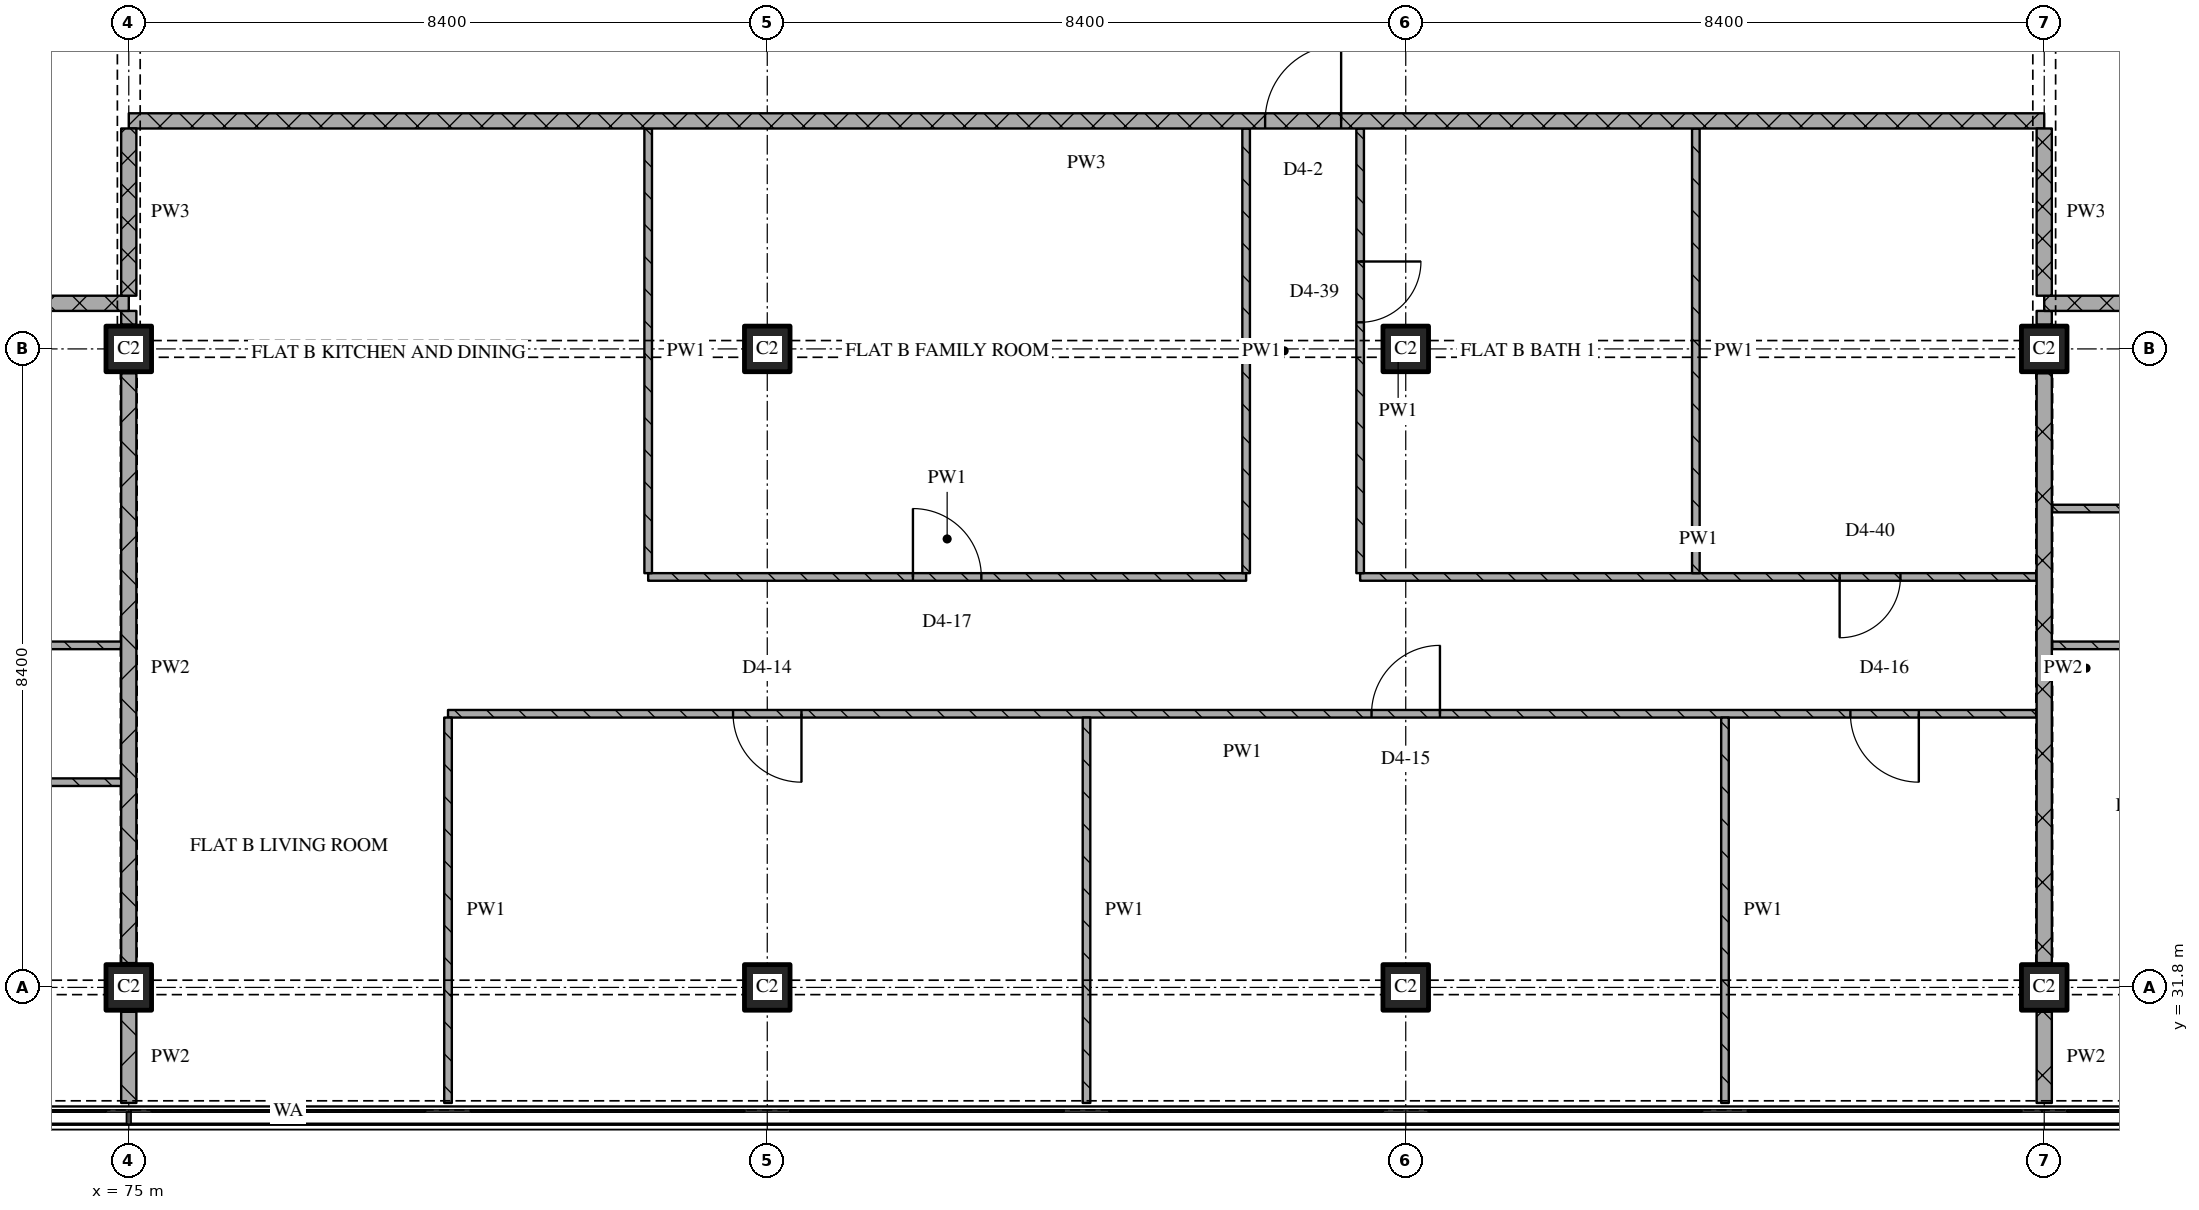
"""IFC4 building model, lengths in metres.
Left out: names, types, materials, properties, quantities, classifications, styles, units other than length and angle.
Written with IfcOpenShell. Run it as: python <this file> out.ifc"""

import sys

from ifc_helpers import new_model, si_unit, direction, frame, frame_2d, origin, origin_2d, place, context, subcontext, project, spatial, rectangle, extrude, element, fill, save


model = new_model("IFC4")
c1 = context("Model", 3, precision=1e-05, world=origin(), true_north=direction((0.0, 1.0)))
c2 = subcontext(c1, "Body", "Model", "MODEL_VIEW")
j1 = project(units=[si_unit("LENGTHUNIT", "METRE"), si_unit("PLANEANGLEUNIT", "RADIAN")], contexts=[c1])
p1 = place(None, origin())
s1 = spatial("IfcSite", under=j1, at=p1, CompositionType="ELEMENT")
p2 = place(p1, origin())
s2 = spatial("IfcBuilding", under=s1, at=p2, CompositionType="ELEMENT")
p3 = place(p2, frame((0.0, 0.0, 241.5)))
s3 = spatial("IfcBuildingStorey", under=s2, at=p3, CompositionType="ELEMENT", Elevation=241.5)
for number, where, z_axis, x_axis in (
    (1, (75.0, 31.8, 0.0), (0.0, 0.0, 1.0), (1.0, 0.0, 0.0)),
    (2, (75.0, 40.2, 0.0), (0.0, 0.0, 1.0), (1.0, 0.0, 0.0)),
    (3, (83.4, 31.8, 0.0), (0.0, 0.0, 1.0), (1.0, 0.0, 0.0)),
    (4, (83.4, 40.2, 0.0), (0.0, 0.0, 1.0), (1.0, 0.0, 0.0)),
    (5, (91.8, 31.8, 0.0), (0.0, 0.0, 1.0), (1.0, 0.0, 0.0)),
    (6, (91.8, 40.2, 0.0), (0.0, 0.0, 1.0), (1.0, 0.0, 0.0)),
    (7, (100.2, 31.8, 0.0), (0.0, 0.0, 1.0), (1.0, 0.0, 0.0)),
    (8, (100.2, 40.2, 0.0), (0.0, 0.0, 1.0), (1.0, 0.0, 0.0)),
):
    element("IfcColumn", number, at=place(p3, frame(where, z_axis=z_axis, x_axis=x_axis)), inside=s3, PredefinedType="COLUMN", context=c2, shape_type="SweptSolid", body=[
        extrude(rectangle(XDim=0.6, YDim=0.6, at=origin_2d()), origin(), (0.0, 0.0, 1.0), 3.6),
    ])
p4 = place(p3, frame((74.9, 34.5, 0.0), z_axis=(0.0, 0.0, 1.0), x_axis=(-1.0, 0.0, 0.0)))
e9 = element("IfcWall", 9, at=p4, inside=s3, PredefinedType="PARTITIONING", context=c2, shape_type="SweptSolid", body=[
    extrude(rectangle(XDim=16.7, YDim=0.1, at=frame_2d((8.35, 0.0))), origin(), (0.0, 0.0, 1.0), 3.32),
])
p5 = place(p4, frame((3.65, 0.0, 0.0)))
e10 = element("IfcOpeningElement", 10, at=p5, cuts=e9, PredefinedType="OPENING", context=c2, shape_type="SweptSolid", body=[
    extrude(rectangle(XDim=0.9, YDim=2.1, at=frame_2d((0.45, 1.05))), frame((0.0, 0.06, 0.0), z_axis=(0.0, -1.0, 0.0), x_axis=(1.0, 0.0, 0.0)), (0.0, 0.0, 1.0), 0.12),
])
p6 = place(p4, frame((12.05, 0.0, 0.0)))
e11 = element("IfcOpeningElement", 11, at=p6, cuts=e9, PredefinedType="OPENING", context=c2, shape_type="SweptSolid", body=[
    extrude(rectangle(XDim=0.9, YDim=2.1, at=frame_2d((0.45, 1.05))), frame((0.0, 0.06, 0.0), z_axis=(0.0, -1.0, 0.0), x_axis=(1.0, 0.0, 0.0)), (0.0, 0.0, 1.0), 0.12),
])
p7 = place(p3, frame((100.1, 35.4, 0.0), z_axis=(0.0, 0.0, 1.0), x_axis=(-1.0, 0.0, 0.0)))
e12 = element("IfcWall", 12, at=p7, inside=s3, PredefinedType="PARTITIONING", context=c2, shape_type="SweptSolid", body=[
    extrude(rectangle(XDim=20.9, YDim=0.1, at=frame_2d((10.45, 0.0))), origin(), (0.0, 0.0, 1.0), 3.32),
])
p8 = place(p7, frame((1.55, 0.0, 0.0)))
e13 = element("IfcOpeningElement", 13, at=p8, cuts=e12, PredefinedType="OPENING", context=c2, shape_type="SweptSolid", body=[
    extrude(rectangle(XDim=0.9, YDim=2.1, at=frame_2d((0.45, 1.05))), frame((0.0, 0.06, 0.0), z_axis=(0.0, -1.0, 0.0), x_axis=(1.0, 0.0, 0.0)), (0.0, 0.0, 1.0), 0.12),
])
p9 = place(p7, frame((7.85, 0.0, 0.0)))
e14 = element("IfcOpeningElement", 14, at=p9, cuts=e12, PredefinedType="OPENING", context=c2, shape_type="SweptSolid", body=[
    extrude(rectangle(XDim=0.9, YDim=2.1, at=frame_2d((0.45, 1.05))), frame((0.0, 0.06, 0.0), z_axis=(0.0, -1.0, 0.0), x_axis=(1.0, 0.0, 0.0)), (0.0, 0.0, 1.0), 0.12),
])
p10 = place(p7, frame((16.25, 0.0, 0.0)))
e15 = element("IfcOpeningElement", 15, at=p10, cuts=e12, PredefinedType="OPENING", context=c2, shape_type="SweptSolid", body=[
    extrude(rectangle(XDim=0.9, YDim=2.1, at=frame_2d((0.45, 1.05))), frame((0.0, 0.06, 0.0), z_axis=(0.0, -1.0, 0.0), x_axis=(1.0, 0.0, 0.0)), (0.0, 0.0, 1.0), 0.12),
])
p11 = place(p3, frame((65.1, 36.3, 0.0), z_axis=(0.0, 0.0, 1.0), x_axis=(1.0, 0.0, 0.0)))
e16 = element("IfcWall", 16, at=p11, inside=s3, PredefinedType="PARTITIONING", context=c2, shape_type="SweptSolid", body=[
    extrude(rectangle(XDim=9.8, YDim=0.1, at=frame_2d((4.9, 0.0))), origin(), (0.0, 0.0, 1.0), 3.32),
])
p12 = place(p11, frame((6.8, 0.0, 0.0)))
e17 = element("IfcOpeningElement", 17, at=p12, cuts=e16, PredefinedType="OPENING", context=c2, shape_type="SweptSolid", body=[
    extrude(rectangle(XDim=0.8, YDim=2.1, at=frame_2d((0.4, 1.05))), frame((0.0, 0.06, 0.0), z_axis=(0.0, -1.0, 0.0), x_axis=(1.0, 0.0, 0.0)), (0.0, 0.0, 1.0), 0.12),
])
p13 = place(p3, frame((112.8, 36.3, 0.0), z_axis=(0.0, 0.0, 1.0), x_axis=(-1.0, 0.0, 0.0)))
e18 = element("IfcWall", 18, at=p13, inside=s3, PredefinedType="PARTITIONING", context=c2, shape_type="SweptSolid", body=[
    extrude(rectangle(XDim=12.5, YDim=0.1, at=frame_2d((6.25, 0.0))), origin(), (0.0, 0.0, 1.0), 3.32),
])
p14 = place(p13, frame((10.05, 0.0, 0.0)))
e19 = element("IfcOpeningElement", 19, at=p14, cuts=e18, PredefinedType="OPENING", context=c2, shape_type="SweptSolid", body=[
    extrude(rectangle(XDim=0.9, YDim=2.1, at=frame_2d((0.45, 1.05))), frame((0.0, 0.06, 0.0), z_axis=(0.0, -1.0, 0.0), x_axis=(1.0, 0.0, 0.0)), (0.0, 0.0, 1.0), 0.12),
])
p15 = place(p3, frame((81.833, 37.2, 0.0), z_axis=(0.0, 0.0, 1.0), x_axis=(1.0, 0.0, 0.0)))
e20 = element("IfcWall", 20, at=p15, inside=s3, PredefinedType="PARTITIONING", context=c2, shape_type="SweptSolid", body=[
    extrude(rectangle(XDim=7.867, YDim=0.1, at=frame_2d((3.933, 0.0))), origin(), (0.0, 0.0, 1.0), 3.32),
])
p16 = place(p15, frame((3.483, 0.0, 0.0)))
e21 = element("IfcOpeningElement", 21, at=p16, cuts=e20, PredefinedType="OPENING", context=c2, shape_type="SweptSolid", body=[
    extrude(rectangle(XDim=0.9, YDim=2.1, at=frame_2d((0.45, 1.05))), frame((0.0, 0.06, 0.0), z_axis=(0.0, -1.0, 0.0), x_axis=(1.0, 0.0, 0.0)), (0.0, 0.0, 1.0), 0.12),
])
p17 = place(p3, frame((91.2, 37.2, 0.0), z_axis=(0.0, 0.0, 1.0), x_axis=(1.0, 0.0, 0.0)))
e22 = element("IfcWall", 22, at=p17, inside=s3, PredefinedType="PARTITIONING", context=c2, shape_type="SweptSolid", body=[
    extrude(rectangle(XDim=8.9, YDim=0.1, at=frame_2d((4.45, 0.0))), origin(), (0.0, 0.0, 1.0), 3.32),
])
p18 = place(p17, frame((6.308, 0.0, 0.0)))
e23 = element("IfcOpeningElement", 23, at=p18, cuts=e22, PredefinedType="OPENING", context=c2, shape_type="SweptSolid", body=[
    extrude(rectangle(XDim=0.8, YDim=2.1, at=frame_2d((0.4, 1.05))), frame((0.0, 0.06, 0.0), z_axis=(0.0, -1.0, 0.0), x_axis=(1.0, 0.0, 0.0)), (0.0, 0.0, 1.0), 0.12),
])
p19 = place(p3, frame((100.3, 38.1, 0.0), z_axis=(0.0, 0.0, 1.0), x_axis=(1.0, 0.0, 0.0)))
e24 = element("IfcWall", 24, at=p19, inside=s3, PredefinedType="PARTITIONING", context=c2, shape_type="SweptSolid", body=[
    extrude(rectangle(XDim=8.6, YDim=0.1, at=frame_2d((4.3, 0.0))), origin(), (0.0, 0.0, 1.0), 3.32),
])
p20 = place(p19, frame((1.75, 0.0, 0.0)))
e25 = element("IfcOpeningElement", 25, at=p20, cuts=e24, PredefinedType="OPENING", context=c2, shape_type="SweptSolid", body=[
    extrude(rectangle(XDim=0.8, YDim=2.1, at=frame_2d((0.4, 1.05))), frame((0.0, 0.06, 0.0), z_axis=(0.0, -1.0, 0.0), x_axis=(1.0, 0.0, 0.0)), (0.0, 0.0, 1.0), 0.12),
])
p21 = place(p3, frame((75.0, 40.8, 0.0), z_axis=(0.0, 0.0, 1.0), x_axis=(-1.0, 0.0, 0.0)))
e26 = element("IfcWall", 26, at=p21, inside=s3, PredefinedType="PARTITIONING", context=c2, shape_type="SweptSolid", body=[
    extrude(rectangle(XDim=24.38, YDim=0.2, at=frame_2d((12.19, 0.0))), origin(), (0.0, 0.0, 1.0), 3.32),
])
p22 = place(p21, frame((10.15, 0.0, 0.0)))
e27 = element("IfcOpeningElement", 27, at=p22, cuts=e26, PredefinedType="OPENING", context=c2, shape_type="SweptSolid", body=[
    extrude(rectangle(XDim=1.0, YDim=2.1, at=frame_2d((0.5, 1.05))), frame((0.0, 0.11, 0.0), z_axis=(0.0, -1.0, 0.0), x_axis=(1.0, 0.0, 0.0)), (0.0, 0.0, 1.0), 0.22),
])
p23 = place(p3, frame((124.58, 40.8, 0.0), z_axis=(0.0, 0.0, 1.0), x_axis=(-1.0, 0.0, 0.0)))
e28 = element("IfcWall", 28, at=p23, inside=s3, PredefinedType="PARTITIONING", context=c2, shape_type="SweptSolid", body=[
    extrude(rectangle(XDim=24.38, YDim=0.2, at=frame_2d((12.19, 0.0))), origin(), (0.0, 0.0, 1.0), 3.32),
])
p24 = place(p23, frame((14.43, 0.0, 0.0)))
e29 = element("IfcOpeningElement", 29, at=p24, cuts=e28, PredefinedType="OPENING", context=c2, shape_type="SweptSolid", body=[
    extrude(rectangle(XDim=1.0, YDim=2.1, at=frame_2d((0.5, 1.05))), frame((0.0, 0.11, 0.0), z_axis=(0.0, -1.0, 0.0), x_axis=(1.0, 0.0, 0.0)), (0.0, 0.0, 1.0), 0.22),
])
p25 = place(p3, frame((100.2, 43.2, 0.0), z_axis=(0.0, 0.0, 1.0), x_axis=(-1.0, 0.0, 0.0)))
e30 = element("IfcWall", 30, at=p25, inside=s3, PredefinedType="PARTITIONING", context=c2, shape_type="SweptSolid", body=[
    extrude(rectangle(XDim=25.2, YDim=0.2, at=frame_2d((12.6, 0.0))), origin(), (0.0, 0.0, 1.0), 3.32),
])
p26 = place(p25, frame((9.25, 0.0, 0.0)))
e31 = element("IfcOpeningElement", 31, at=p26, cuts=e30, PredefinedType="OPENING", context=c2, shape_type="SweptSolid", body=[
    extrude(rectangle(XDim=1.0, YDim=2.1, at=frame_2d((0.5, 1.05))), frame((0.0, 0.11, 0.0), z_axis=(0.0, -1.0, 0.0), x_axis=(1.0, 0.0, 0.0)), (0.0, 0.0, 1.0), 0.22),
])
p27 = place(p3, frame((75.0, 43.1, 0.0), z_axis=(0.0, 0.0, 1.0), x_axis=(0.0, -1.0, 0.0)))
e32 = element("IfcWall", 32, at=p27, inside=s3, PredefinedType="PARTITIONING", context=c2, shape_type="SweptSolid", body=[
    extrude(rectangle(XDim=2.2, YDim=0.2, at=frame_2d((1.1, 0.0))), origin(), (0.0, 0.0, 1.0), 2.53),
])
p28 = place(p3, frame((75.0, 31.48, 0.0), z_axis=(0.0, 0.0, 1.0), x_axis=(0.0, -1.0, 0.0)))
e33 = element("IfcWall", 33, at=p28, inside=s3, PredefinedType="PARTITIONING", context=c2, shape_type="SweptSolid", body=[
    extrude(rectangle(XDim=1.2, YDim=0.2, at=frame_2d((0.6, 0.0))), origin(), (0.0, 0.0, 1.0), 3.32),
])
p29 = place(p3, frame((75.0, 39.88, 0.0), z_axis=(0.0, 0.0, 1.0), x_axis=(0.0, -1.0, 0.0)))
e34 = element("IfcWall", 34, at=p29, inside=s3, PredefinedType="PARTITIONING", context=c2, shape_type="SweptSolid", body=[
    extrude(rectangle(XDim=7.76, YDim=0.2, at=frame_2d((3.88, 0.0))), origin(), (0.0, 0.0, 1.0), 2.72),
])
p30 = place(p3, frame((75.0, 40.7, 0.0), z_axis=(0.0, 0.0, 1.0), x_axis=(0.0, -1.0, 0.0)))
e35 = element("IfcWall", 35, at=p30, inside=s3, PredefinedType="PARTITIONING", context=c2, shape_type="SweptSolid", body=[
    extrude(rectangle(XDim=0.18, YDim=0.2, at=frame_2d((0.09, 0.0))), origin(), (0.0, 0.0, 1.0), 3.32),
])
p31 = place(p3, frame((79.2, 35.35, 0.0), z_axis=(0.0, 0.0, 1.0), x_axis=(0.0, -1.0, 0.0)))
e36 = element("IfcWall", 36, at=p31, inside=s3, PredefinedType="PARTITIONING", context=c2, shape_type="SweptSolid", body=[
    extrude(rectangle(XDim=5.07, YDim=0.1, at=frame_2d((2.535, 0.0))), origin(), (0.0, 0.0, 1.0), 3.32),
])
p32 = place(p3, frame((81.833, 43.1, 0.0), z_axis=(0.0, 0.0, 1.0), x_axis=(0.0, -1.0, 0.0)))
e37 = element("IfcWall", 37, at=p32, inside=s3, PredefinedType="PARTITIONING", context=c2, shape_type="SweptSolid", body=[
    extrude(rectangle(XDim=5.85, YDim=0.1, at=frame_2d((2.925, 0.0))), origin(), (0.0, 0.0, 1.0), 3.32),
])
p33 = place(p3, frame((87.6, 35.35, 0.0), z_axis=(0.0, 0.0, 1.0), x_axis=(0.0, -1.0, 0.0)))
e38 = element("IfcWall", 38, at=p33, inside=s3, PredefinedType="PARTITIONING", context=c2, shape_type="SweptSolid", body=[
    extrude(rectangle(XDim=5.07, YDim=0.1, at=frame_2d((2.535, 0.0))), origin(), (0.0, 0.0, 1.0), 3.32),
])
p34 = place(p3, frame((89.7, 43.1, 0.0), z_axis=(0.0, 0.0, 1.0), x_axis=(0.0, -1.0, 0.0)))
e39 = element("IfcWall", 39, at=p34, inside=s3, PredefinedType="PARTITIONING", context=c2, shape_type="SweptSolid", body=[
    extrude(rectangle(XDim=5.85, YDim=0.1, at=frame_2d((2.925, 0.0))), origin(), (0.0, 0.0, 1.0), 3.32),
])
p35 = place(p3, frame((91.2, 43.1, 0.0), z_axis=(0.0, 0.0, 1.0), x_axis=(0.0, -1.0, 0.0)))
e40 = element("IfcWall", 40, at=p35, inside=s3, PredefinedType="PARTITIONING", context=c2, shape_type="SweptSolid", body=[
    extrude(rectangle(XDim=5.85, YDim=0.1, at=frame_2d((2.925, 0.0))), origin(), (0.0, 0.0, 1.0), 3.32),
])
p36 = place(p35, frame((1.75, 0.0, 0.0)))
e41 = element("IfcOpeningElement", 41, at=p36, cuts=e40, PredefinedType="OPENING", context=c2, shape_type="SweptSolid", body=[
    extrude(rectangle(XDim=0.8, YDim=2.1, at=frame_2d((0.4, 1.05))), frame((0.0, 0.06, 0.0), z_axis=(0.0, -1.0, 0.0), x_axis=(1.0, 0.0, 0.0)), (0.0, 0.0, 1.0), 0.12),
])
p37 = place(p3, frame((95.617, 43.1, 0.0), z_axis=(0.0, 0.0, 1.0), x_axis=(0.0, -1.0, 0.0)))
e42 = element("IfcWall", 42, at=p37, inside=s3, PredefinedType="PARTITIONING", context=c2, shape_type="SweptSolid", body=[
    extrude(rectangle(XDim=5.85, YDim=0.1, at=frame_2d((2.925, 0.0))), origin(), (0.0, 0.0, 1.0), 3.32),
])
p38 = place(p3, frame((96.0, 35.35, 0.0), z_axis=(0.0, 0.0, 1.0), x_axis=(0.0, -1.0, 0.0)))
e43 = element("IfcWall", 43, at=p38, inside=s3, PredefinedType="PARTITIONING", context=c2, shape_type="SweptSolid", body=[
    extrude(rectangle(XDim=5.07, YDim=0.1, at=frame_2d((2.535, 0.0))), origin(), (0.0, 0.0, 1.0), 3.32),
])
p39 = place(p3, frame((100.2, 43.1, 0.0), z_axis=(0.0, 0.0, 1.0), x_axis=(0.0, -1.0, 0.0)))
e44 = element("IfcWall", 44, at=p39, inside=s3, PredefinedType="PARTITIONING", context=c2, shape_type="SweptSolid", body=[
    extrude(rectangle(XDim=2.2, YDim=0.2, at=frame_2d((1.1, 0.0))), origin(), (0.0, 0.0, 1.0), 2.53),
])
p40 = place(p3, frame((100.2, 31.48, 0.0), z_axis=(0.0, 0.0, 1.0), x_axis=(0.0, -1.0, 0.0)))
e45 = element("IfcWall", 45, at=p40, inside=s3, PredefinedType="PARTITIONING", context=c2, shape_type="SweptSolid", body=[
    extrude(rectangle(XDim=1.2, YDim=0.2, at=frame_2d((0.6, 0.0))), origin(), (0.0, 0.0, 1.0), 3.32),
])
p41 = place(p3, frame((100.2, 39.88, 0.0), z_axis=(0.0, 0.0, 1.0), x_axis=(0.0, -1.0, 0.0)))
e46 = element("IfcWall", 46, at=p41, inside=s3, PredefinedType="PARTITIONING", context=c2, shape_type="SweptSolid", body=[
    extrude(rectangle(XDim=7.76, YDim=0.2, at=frame_2d((3.88, 0.0))), origin(), (0.0, 0.0, 1.0), 2.72),
])
p42 = place(p3, frame((100.2, 40.7, 0.0), z_axis=(0.0, 0.0, 1.0), x_axis=(0.0, -1.0, 0.0)))
e47 = element("IfcWall", 47, at=p42, inside=s3, PredefinedType="PARTITIONING", context=c2, shape_type="SweptSolid", body=[
    extrude(rectangle(XDim=0.18, YDim=0.2, at=frame_2d((0.09, 0.0))), origin(), (0.0, 0.0, 1.0), 3.32),
])
p43 = place(p8, origin())
e48 = element("IfcDoor", 48, at=p43, inside=s3, OperationType="SINGLE_SWING_LEFT", PredefinedType="DOOR", context=c2, shape_type="SweptSolid", body=[
    extrude(rectangle(XDim=0.9, YDim=2.1, at=frame_2d((0.45, 1.05))), frame((0.0, 0.025, 0.0), z_axis=(0.0, -1.0, 0.0), x_axis=(1.0, 0.0, 0.0)), (0.0, 0.0, 1.0), 0.05),
])
fill(e13, e48)
p44 = place(p9, origin())
e49 = element("IfcDoor", 49, at=p44, inside=s3, OperationType="SINGLE_SWING_RIGHT", PredefinedType="DOOR", context=c2, shape_type="SweptSolid", body=[
    extrude(rectangle(XDim=0.9, YDim=2.1, at=frame_2d((0.45, 1.05))), frame((0.0, 0.025, 0.0), z_axis=(0.0, -1.0, 0.0), x_axis=(1.0, 0.0, 0.0)), (0.0, 0.0, 1.0), 0.05),
])
fill(e14, e49)
p45 = place(p10, origin())
e50 = element("IfcDoor", 50, at=p45, inside=s3, OperationType="SINGLE_SWING_LEFT", PredefinedType="DOOR", context=c2, shape_type="SweptSolid", body=[
    extrude(rectangle(XDim=0.9, YDim=2.1, at=frame_2d((0.45, 1.05))), frame((0.0, 0.025, 0.0), z_axis=(0.0, -1.0, 0.0), x_axis=(1.0, 0.0, 0.0)), (0.0, 0.0, 1.0), 0.05),
])
fill(e15, e50)
p46 = place(p16, origin())
e51 = element("IfcDoor", 51, at=p46, inside=s3, OperationType="SINGLE_SWING_LEFT", PredefinedType="DOOR", context=c2, shape_type="SweptSolid", body=[
    extrude(rectangle(XDim=0.9, YDim=2.1, at=frame_2d((0.45, 1.05))), frame((0.0, 0.025, 0.0), z_axis=(0.0, -1.0, 0.0), x_axis=(1.0, 0.0, 0.0)), (0.0, 0.0, 1.0), 0.05),
])
fill(e21, e51)
p47 = place(p18, origin())
e52 = element("IfcDoor", 52, at=p47, inside=s3, OperationType="SINGLE_SWING_RIGHT", PredefinedType="DOOR", context=c2, shape_type="SweptSolid", body=[
    extrude(rectangle(XDim=0.8, YDim=2.1, at=frame_2d((0.4, 1.05))), frame((0.0, 0.025, 0.0), z_axis=(0.0, -1.0, 0.0), x_axis=(1.0, 0.0, 0.0)), (0.0, 0.0, 1.0), 0.05),
])
fill(e23, e52)
p48 = place(p26, origin())
e53 = element("IfcDoor", 53, at=p48, inside=s3, OperationType="SINGLE_SWING_RIGHT", PredefinedType="DOOR", context=c2, shape_type="SweptSolid", body=[
    extrude(rectangle(XDim=1.0, YDim=2.1, at=frame_2d((0.5, 1.05))), frame((0.0, 0.025, 0.0), z_axis=(0.0, -1.0, 0.0), x_axis=(1.0, 0.0, 0.0)), (0.0, 0.0, 1.0), 0.05),
])
fill(e31, e53)
p49 = place(p36, origin())
e54 = element("IfcDoor", 54, at=p49, inside=s3, OperationType="SINGLE_SWING_LEFT", PredefinedType="DOOR", context=c2, shape_type="SweptSolid", body=[
    extrude(rectangle(XDim=0.8, YDim=2.1, at=frame_2d((0.4, 1.05))), frame((0.0, 0.025, 0.0), z_axis=(0.0, -1.0, 0.0), x_axis=(1.0, 0.0, 0.0)), (0.0, 0.0, 1.0), 0.05),
])
fill(e41, e54)
save(model, sys.argv[1])
